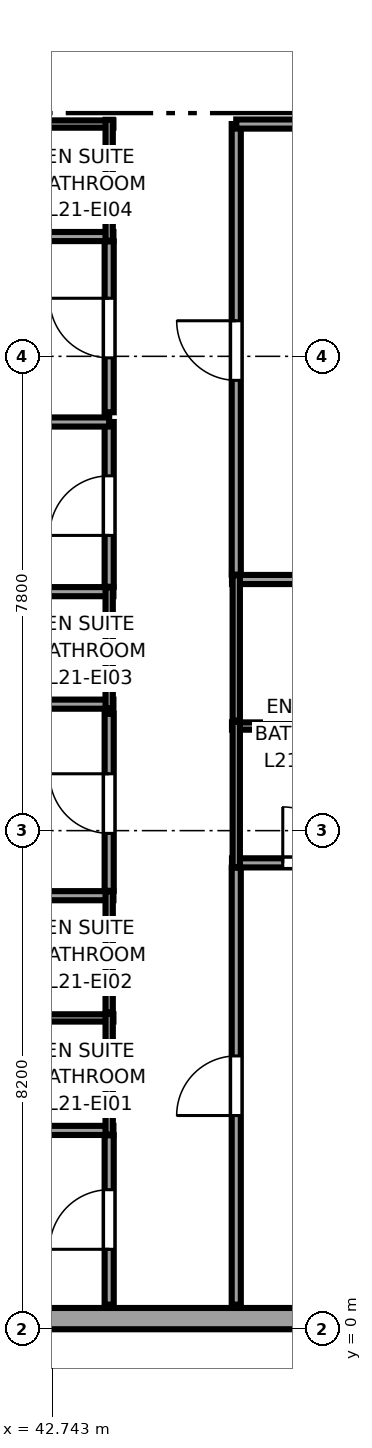
"""IFC4 building model, lengths in metres.
Left out: names, types, materials, properties, quantities, classifications, styles, units other than length and angle.
Written with IfcOpenShell. Run it as: python <this file> out.ifc"""

import sys

from ifc_helpers import new_model, si_unit, direction, frame, frame_2d, origin, place, context, subcontext, project, spatial, rectangle, extrude, source, transform, mapped, element, fill, save


model = new_model("IFC4")
c1 = context("Model", 3, precision=1e-05, world=origin(), true_north=direction((0.0, 1.0)))
c2 = subcontext(c1, "Body", "Model", "MODEL_VIEW")
j1 = project(units=[si_unit("LENGTHUNIT", "METRE"), si_unit("PLANEANGLEUNIT", "RADIAN")], contexts=[c1])
p1 = place(None, origin())
s1 = spatial("IfcSite", under=j1, at=p1, CompositionType="ELEMENT")
p2 = place(p1, origin())
s2 = spatial("IfcBuilding", under=s1, at=p2, CompositionType="ELEMENT")
p3 = place(p2, frame((0.0, 0.0, 85.25)))
s3 = spatial("IfcBuildingStorey", under=s2, at=p3, CompositionType="ELEMENT", Elevation=85.25)
p4 = place(p3, frame((34.375, 0.175, 0.0), z_axis=(0.0, 0.0, 1.0), x_axis=(1.0, 0.0, 0.0)))
e1 = element("IfcWall", 1, at=p4, inside=s3, PredefinedType="SOLIDWALL", context=c2, shape_type="SweptSolid", body=[
    extrude(rectangle(XDim=18.008, YDim=0.35, at=frame_2d((9.004, 0.0))), origin(), (0.0, 0.0, 1.0), 3.37),
])
p5 = place(p4, frame((1.651, 0.0, 0.68)))
e2 = element("IfcOpeningElement", 2, at=p5, cuts=e1, PredefinedType="OPENING", context=c2, shape_type="SweptSolid", body=[
    extrude(rectangle(XDim=2.1, YDim=1.9, at=frame_2d((1.05, 0.95))), frame((0.0, 0.185, 0.0), z_axis=(0.0, -1.0, 0.0), x_axis=(1.0, 0.0, 0.0)), (0.0, 0.0, 1.0), 0.37),
])
p6 = place(p3, frame((41.16, 3.27, 0.0), z_axis=(0.0, 0.0, 1.0), x_axis=(1.0, 0.0, 0.0)))
e3 = element("IfcWall", 3, at=p6, inside=s3, PredefinedType="PARTITIONING", context=c2, shape_type="SweptSolid", body=[
    extrude(rectangle(XDim=2.59, YDim=0.15, at=frame_2d((1.295, 0.0))), origin(), (0.0, 0.0, 1.0), 3.37),
])
p7 = place(p3, frame((41.16, 5.12, 0.0), z_axis=(0.0, 0.0, 1.0), x_axis=(1.0, 0.0, 0.0)))
e4 = element("IfcWall", 4, at=p7, inside=s3, PredefinedType="PLUMBINGWALL", context=c2, shape_type="SweptSolid", body=[
    extrude(rectangle(XDim=2.59, YDim=0.12, at=frame_2d((1.295, 0.0))), origin(), (0.0, 0.0, 1.0), 3.37),
])
p8 = place(p3, frame((43.68, 3.2, 0.0), z_axis=(0.0, 0.0, 1.0), x_axis=(0.0, 1.0, 0.0)))
e5 = element("IfcWall", 5, at=p8, inside=s3, PredefinedType="PLUMBINGWALL", context=c2, shape_type="SweptSolid", body=[
    extrude(rectangle(XDim=1.99, YDim=0.12, at=frame_2d((0.995, 0.0))), origin(), (0.0, 0.0, 1.0), 3.37),
])
p9 = place(p3, frame((41.16, 7.13, 0.0), z_axis=(0.0, 0.0, 1.0), x_axis=(1.0, 0.0, 0.0)))
e6 = element("IfcWall", 6, at=p9, inside=s3, PredefinedType="PARTITIONING", context=c2, shape_type="SweptSolid", body=[
    extrude(rectangle(XDim=2.59, YDim=0.15, at=frame_2d((1.295, 0.0))), origin(), (0.0, 0.0, 1.0), 3.37),
])
p10 = place(p3, frame((43.68, 5.21, 0.0), z_axis=(0.0, 0.0, 1.0), x_axis=(0.0, 1.0, 0.0)))
e7 = element("IfcWall", 7, at=p10, inside=s3, PredefinedType="PLUMBINGWALL", context=c2, shape_type="SweptSolid", body=[
    extrude(rectangle(XDim=1.99, YDim=0.12, at=frame_2d((0.995, 0.0))), origin(), (0.0, 0.0, 1.0), 3.37),
])
p11 = place(p3, frame((34.65, 10.28, 0.0), z_axis=(0.0, 0.0, 1.0), x_axis=(1.0, 0.0, 0.0)))
e8 = element("IfcWall", 8, at=p11, inside=s3, PredefinedType="PARTITIONING", context=c2, shape_type="SweptSolid", body=[
    extrude(rectangle(XDim=9.1, YDim=0.15, at=frame_2d((4.55, 0.0))), origin(), (0.0, 0.0, 1.0), 3.37),
])
p12 = place(p3, frame((41.16, 12.13, 0.0), z_axis=(0.0, 0.0, 1.0), x_axis=(1.0, 0.0, 0.0)))
e9 = element("IfcWall", 9, at=p12, inside=s3, PredefinedType="PARTITIONING", context=c2, shape_type="SweptSolid", body=[
    extrude(rectangle(XDim=2.59, YDim=0.15, at=frame_2d((1.295, 0.0))), origin(), (0.0, 0.0, 1.0), 3.37),
])
p13 = place(p3, frame((43.68, 10.21, 0.0), z_axis=(0.0, 0.0, 1.0), x_axis=(0.0, 1.0, 0.0)))
e10 = element("IfcWall", 10, at=p13, inside=s3, PredefinedType="PLUMBINGWALL", context=c2, shape_type="SweptSolid", body=[
    extrude(rectangle(XDim=1.99, YDim=0.12, at=frame_2d((0.995, 0.0))), origin(), (0.0, 0.0, 1.0), 3.37),
])
p14 = place(p3, frame((41.16, 17.97, 0.0), z_axis=(0.0, 0.0, 1.0), x_axis=(1.0, 0.0, 0.0)))
e11 = element("IfcWall", 11, at=p14, inside=s3, PredefinedType="PARTITIONING", context=c2, shape_type="SweptSolid", body=[
    extrude(rectangle(XDim=2.59, YDim=0.15, at=frame_2d((1.295, 0.0))), origin(), (0.0, 0.0, 1.0), 3.37),
])
p15 = place(p3, frame((41.16, 19.82, 0.0), z_axis=(0.0, 0.0, 1.0), x_axis=(1.0, 0.0, 0.0)))
e12 = element("IfcWall", 12, at=p15, inside=s3, PredefinedType="PLUMBINGWALL", context=c2, shape_type="SweptSolid", body=[
    extrude(rectangle(XDim=2.59, YDim=0.12, at=frame_2d((1.295, 0.0))), origin(), (0.0, 0.0, 1.0), 3.37),
])
p16 = place(p3, frame((43.68, 17.9, 0.0), z_axis=(0.0, 0.0, 1.0), x_axis=(0.0, 1.0, 0.0)))
e13 = element("IfcWall", 13, at=p16, inside=s3, PredefinedType="PLUMBINGWALL", context=c2, shape_type="SweptSolid", body=[
    extrude(rectangle(XDim=1.99, YDim=0.12, at=frame_2d((0.995, 0.0))), origin(), (0.0, 0.0, 1.0), 3.37),
])
p17 = place(p3, frame((45.7, 7.67, 0.0), z_axis=(0.0, 0.0, 1.0), x_axis=(1.0, 0.0, 0.0)))
e14 = element("IfcWall", 14, at=p17, inside=s3, PredefinedType="PARTITIONING", context=c2, shape_type="SweptSolid", body=[
    extrude(rectangle(XDim=2.59, YDim=0.15, at=frame_2d((1.295, 0.0))), origin(), (0.0, 0.0, 1.0), 3.37),
])
p18 = place(p17, frame((0.835, 0.0, 0.0)))
e15 = element("IfcOpeningElement", 15, at=p18, cuts=e14, PredefinedType="OPENING", context=c2, shape_type="SweptSolid", body=[
    extrude(rectangle(XDim=0.92, YDim=2.01, at=frame_2d((0.46, 1.005))), frame((0.0, 0.085, 0.0), z_axis=(0.0, -1.0, 0.0), x_axis=(1.0, 0.0, 0.0)), (0.0, 0.0, 1.0), 0.17),
])
p19 = place(p3, frame((45.7, 9.92, 0.0), z_axis=(0.0, 0.0, 1.0), x_axis=(1.0, 0.0, 0.0)))
e16 = element("IfcWall", 16, at=p19, inside=s3, PredefinedType="PLUMBINGWALL", context=c2, shape_type="SweptSolid", body=[
    extrude(rectangle(XDim=2.59, YDim=0.12, at=frame_2d((1.295, 0.0))), origin(), (0.0, 0.0, 1.0), 3.37),
])
p20 = place(p3, frame((45.77, 7.6, 0.0), z_axis=(0.0, 0.0, 1.0), x_axis=(0.0, 1.0, 0.0)))
e17 = element("IfcWall", 17, at=p20, inside=s3, PredefinedType="PLUMBINGWALL", context=c2, shape_type="SweptSolid", body=[
    extrude(rectangle(XDim=2.39, YDim=0.12, at=frame_2d((1.195, 0.0))), origin(), (0.0, 0.0, 1.0), 3.37),
])
p21 = place(p3, frame((45.7, 12.33, 0.0), z_axis=(0.0, 0.0, 1.0), x_axis=(1.0, 0.0, 0.0)))
e18 = element("IfcWall", 18, at=p21, inside=s3, PredefinedType="PARTITIONING", context=c2, shape_type="SweptSolid", body=[
    extrude(rectangle(XDim=2.59, YDim=0.15, at=frame_2d((1.295, 0.0))), origin(), (0.0, 0.0, 1.0), 3.37),
])
p22 = place(p3, frame((45.77, 10.01, 0.0), z_axis=(0.0, 0.0, 1.0), x_axis=(0.0, 1.0, 0.0)))
e19 = element("IfcWall", 19, at=p22, inside=s3, PredefinedType="PLUMBINGWALL", context=c2, shape_type="SweptSolid", body=[
    extrude(rectangle(XDim=2.39, YDim=0.12, at=frame_2d((1.195, 0.0))), origin(), (0.0, 0.0, 1.0), 3.37),
])
p23 = place(p3, frame((43.68, 0.405, 0.0), z_axis=(0.0, 0.0, 1.0), x_axis=(0.0, 1.0, 0.0)))
e20 = element("IfcWall", 20, at=p23, inside=s3, PredefinedType="PARTITIONING", context=c2, shape_type="SweptSolid", body=[
    extrude(rectangle(XDim=2.785, YDim=0.15, at=frame_2d((1.393, 0.0))), origin(), (0.0, 0.0, 1.0), 3.37),
])
p24 = place(p23, frame((0.91, 0.0, 0.0)))
e21 = element("IfcOpeningElement", 21, at=p24, cuts=e20, PredefinedType="OPENING", context=c2, shape_type="SweptSolid", body=[
    extrude(rectangle(XDim=0.98, YDim=2.12, at=frame_2d((0.49, 1.06))), frame((0.0, 0.085, 0.0), z_axis=(0.0, -1.0, 0.0), x_axis=(1.0, 0.0, 0.0)), (0.0, 0.0, 1.0), 0.17),
])
p25 = place(p3, frame((43.68, 7.21, 0.0), z_axis=(0.0, 0.0, 1.0), x_axis=(0.0, 1.0, 0.0)))
e22 = element("IfcWall", 22, at=p25, inside=s3, PredefinedType="PARTITIONING", context=c2, shape_type="SweptSolid", body=[
    extrude(rectangle(XDim=2.91, YDim=0.15, at=frame_2d((1.455, 0.0))), origin(), (0.0, 0.0, 1.0), 3.37),
])
p26 = place(p25, frame((0.945, 0.0, 0.0)))
e23 = element("IfcOpeningElement", 23, at=p26, cuts=e22, PredefinedType="OPENING", context=c2, shape_type="SweptSolid", body=[
    extrude(rectangle(XDim=0.98, YDim=2.12, at=frame_2d((0.49, 1.06))), frame((0.0, 0.085, 0.0), z_axis=(0.0, -1.0, 0.0), x_axis=(1.0, 0.0, 0.0)), (0.0, 0.0, 1.0), 0.17),
])
p27 = place(p3, frame((43.68, 12.21, 0.0), z_axis=(0.0, 0.0, 1.0), x_axis=(0.0, 1.0, 0.0)))
e24 = element("IfcWall", 24, at=p27, inside=s3, PredefinedType="PARTITIONING", context=c2, shape_type="SweptSolid", body=[
    extrude(rectangle(XDim=2.71, YDim=0.15, at=frame_2d((1.355, 0.0))), origin(), (0.0, 0.0, 1.0), 3.37),
])
p28 = place(p27, frame((0.845, 0.0, 0.0)))
e25 = element("IfcOpeningElement", 25, at=p28, cuts=e24, PredefinedType="OPENING", context=c2, shape_type="SweptSolid", body=[
    extrude(rectangle(XDim=0.98, YDim=2.12, at=frame_2d((0.49, 1.06))), frame((0.0, 0.085, 0.0), z_axis=(0.0, -1.0, 0.0), x_axis=(1.0, 0.0, 0.0)), (0.0, 0.0, 1.0), 0.17),
])
p29 = place(p3, frame((34.65, 14.92, 0.0), z_axis=(0.0, 0.0, 1.0), x_axis=(1.0, 0.0, 0.0)))
e26 = element("IfcWall", 26, at=p29, inside=s3, PredefinedType="PARTITIONING", context=c2, shape_type="SweptSolid", body=[
    extrude(rectangle(XDim=9.03, YDim=0.15, at=frame_2d((4.515, 0.0))), origin(), (0.0, 0.0, 1.0), 3.37),
])
p30 = place(p3, frame((43.68, 15.08, 0.0), z_axis=(0.0, 0.0, 1.0), x_axis=(0.0, 1.0, 0.0)))
e27 = element("IfcWall", 27, at=p30, inside=s3, PredefinedType="PARTITIONING", context=c2, shape_type="SweptSolid", body=[
    extrude(rectangle(XDim=2.81, YDim=0.15, at=frame_2d((1.405, 0.0))), origin(), (0.0, 0.0, 1.0), 3.37),
])
p31 = place(p30, frame((0.895, 0.0, 0.0)))
e28 = element("IfcOpeningElement", 28, at=p31, cuts=e27, PredefinedType="OPENING", context=c2, shape_type="SweptSolid", body=[
    extrude(rectangle(XDim=0.98, YDim=2.12, at=frame_2d((0.49, 1.06))), frame((0.0, 0.085, 0.0), z_axis=(0.0, -1.0, 0.0), x_axis=(1.0, 0.0, 0.0)), (0.0, 0.0, 1.0), 0.17),
])
p32 = place(p3, frame((45.77, 0.405, 0.0), z_axis=(0.0, 0.0, 1.0), x_axis=(0.0, 1.0, 0.0)))
e29 = element("IfcWall", 29, at=p32, inside=s3, PredefinedType="PARTITIONING", context=c2, shape_type="SweptSolid", body=[
    extrude(rectangle(XDim=7.185, YDim=0.15, at=frame_2d((3.593, 0.0))), origin(), (0.0, 0.0, 1.0), 3.37),
])
p33 = place(p32, frame((3.11, 0.0, 0.0)))
e30 = element("IfcOpeningElement", 30, at=p33, cuts=e29, PredefinedType="OPENING", context=c2, shape_type="SweptSolid", body=[
    extrude(rectangle(XDim=0.98, YDim=2.12, at=frame_2d((0.49, 1.06))), frame((0.0, 0.085, 0.0), z_axis=(0.0, -1.0, 0.0), x_axis=(1.0, 0.0, 0.0)), (0.0, 0.0, 1.0), 0.17),
])
p34 = place(p3, frame((45.77, 12.41, 0.0), z_axis=(0.0, 0.0, 1.0), x_axis=(0.0, 1.0, 0.0)))
e31 = element("IfcWall", 31, at=p34, inside=s3, PredefinedType="PARTITIONING", context=c2, shape_type="SweptSolid", body=[
    extrude(rectangle(XDim=7.41, YDim=0.15, at=frame_2d((3.705, 0.0))), origin(), (0.0, 0.0, 1.0), 3.37),
])
p35 = place(p34, frame((3.195, 0.0, 0.0)))
e32 = element("IfcOpeningElement", 32, at=p35, cuts=e31, PredefinedType="OPENING", context=c2, shape_type="SweptSolid", body=[
    extrude(rectangle(XDim=0.98, YDim=2.12, at=frame_2d((0.49, 1.06))), frame((0.0, 0.085, 0.0), z_axis=(0.0, -1.0, 0.0), x_axis=(1.0, 0.0, 0.0)), (0.0, 0.0, 1.0), 0.17),
])
p36 = place(p3, frame((45.77, 19.82, 0.0), z_axis=(0.0, 0.0, 1.0), x_axis=(1.0, 0.0, 0.0)))
e33 = element("IfcWall", 33, at=p36, inside=s3, PredefinedType="PARTITIONING", context=c2, shape_type="SweptSolid", body=[
    extrude(rectangle(XDim=10.825, YDim=0.15, at=frame_2d((5.413, 0.0))), origin(), (0.0, 0.0, 1.0), 3.37),
])
m1 = source(origin(), c2, "Body", "SweptSolid", [
    extrude(rectangle(XDim=0.92, YDim=2.01, at=frame_2d((0.46, 1.005))), frame((0.0, 0.025, 0.0), z_axis=(0.0, -1.0, 0.0), x_axis=(1.0, 0.0, 0.0)), (0.0, 0.0, 1.0), 0.05),
])
p37 = place(p18, origin())
e34 = element("IfcDoor", 34, at=p37, inside=s3, OperationType="SINGLE_SWING_LEFT", PredefinedType="DOOR", context=c2, shape_type="MappedRepresentation", body=[
    mapped(m1, transform((0.0, 0.0, 0.0), x_axis=(1.0, 0.0, 0.0), y_axis=(0.0, 1.0, 0.0), z_axis=(0.0, 0.0, 1.0), scale=1.0)),
])
fill(e15, e34)
m2 = source(origin(), c2, "Body", "SweptSolid", [
    extrude(rectangle(XDim=0.98, YDim=2.12, at=frame_2d((0.49, 1.06))), frame((0.0, 0.025, 0.0), z_axis=(0.0, -1.0, 0.0), x_axis=(1.0, 0.0, 0.0)), (0.0, 0.0, 1.0), 0.05),
])
p38 = place(p24, origin())
e35 = element("IfcDoor", 35, at=p38, inside=s3, OperationType="SINGLE_SWING_LEFT", PredefinedType="DOOR", context=c2, shape_type="MappedRepresentation", body=[
    mapped(m2, transform((0.0, 0.0, 0.0), x_axis=(1.0, 0.0, 0.0), y_axis=(0.0, 1.0, 0.0), z_axis=(0.0, 0.0, 1.0), scale=1.0)),
])
fill(e21, e35)
p39 = place(p26, origin())
e36 = element("IfcDoor", 36, at=p39, inside=s3, OperationType="SINGLE_SWING_RIGHT", PredefinedType="DOOR", context=c2, shape_type="MappedRepresentation", body=[
    mapped(m2, transform((0.0, 0.0, 0.0), x_axis=(1.0, 0.0, 0.0), y_axis=(0.0, 1.0, 0.0), z_axis=(0.0, 0.0, 1.0), scale=1.0)),
])
fill(e23, e36)
p40 = place(p28, origin())
e37 = element("IfcDoor", 37, at=p40, inside=s3, OperationType="SINGLE_SWING_LEFT", PredefinedType="DOOR", context=c2, shape_type="MappedRepresentation", body=[
    mapped(m2, transform((0.0, 0.0, 0.0), x_axis=(1.0, 0.0, 0.0), y_axis=(0.0, 1.0, 0.0), z_axis=(0.0, 0.0, 1.0), scale=1.0)),
])
fill(e25, e37)
p41 = place(p31, origin())
e38 = element("IfcDoor", 38, at=p41, inside=s3, OperationType="SINGLE_SWING_RIGHT", PredefinedType="DOOR", context=c2, shape_type="MappedRepresentation", body=[
    mapped(m2, transform((0.0, 0.0, 0.0), x_axis=(1.0, 0.0, 0.0), y_axis=(0.0, 1.0, 0.0), z_axis=(0.0, 0.0, 1.0), scale=1.0)),
])
fill(e28, e38)
p42 = place(p33, origin())
e39 = element("IfcDoor", 39, at=p42, inside=s3, OperationType="SINGLE_SWING_LEFT", PredefinedType="DOOR", context=c2, shape_type="MappedRepresentation", body=[
    mapped(m2, transform((0.0, 0.0, 0.0), x_axis=(1.0, 0.0, 0.0), y_axis=(0.0, 1.0, 0.0), z_axis=(0.0, 0.0, 1.0), scale=1.0)),
])
fill(e30, e39)
p43 = place(p35, origin())
e40 = element("IfcDoor", 40, at=p43, inside=s3, OperationType="SINGLE_SWING_RIGHT", PredefinedType="DOOR", context=c2, shape_type="MappedRepresentation", body=[
    mapped(m2, transform((0.0, 0.0, 0.0), x_axis=(1.0, 0.0, 0.0), y_axis=(0.0, 1.0, 0.0), z_axis=(0.0, 0.0, 1.0), scale=1.0)),
])
fill(e32, e40)
save(model, sys.argv[1])
